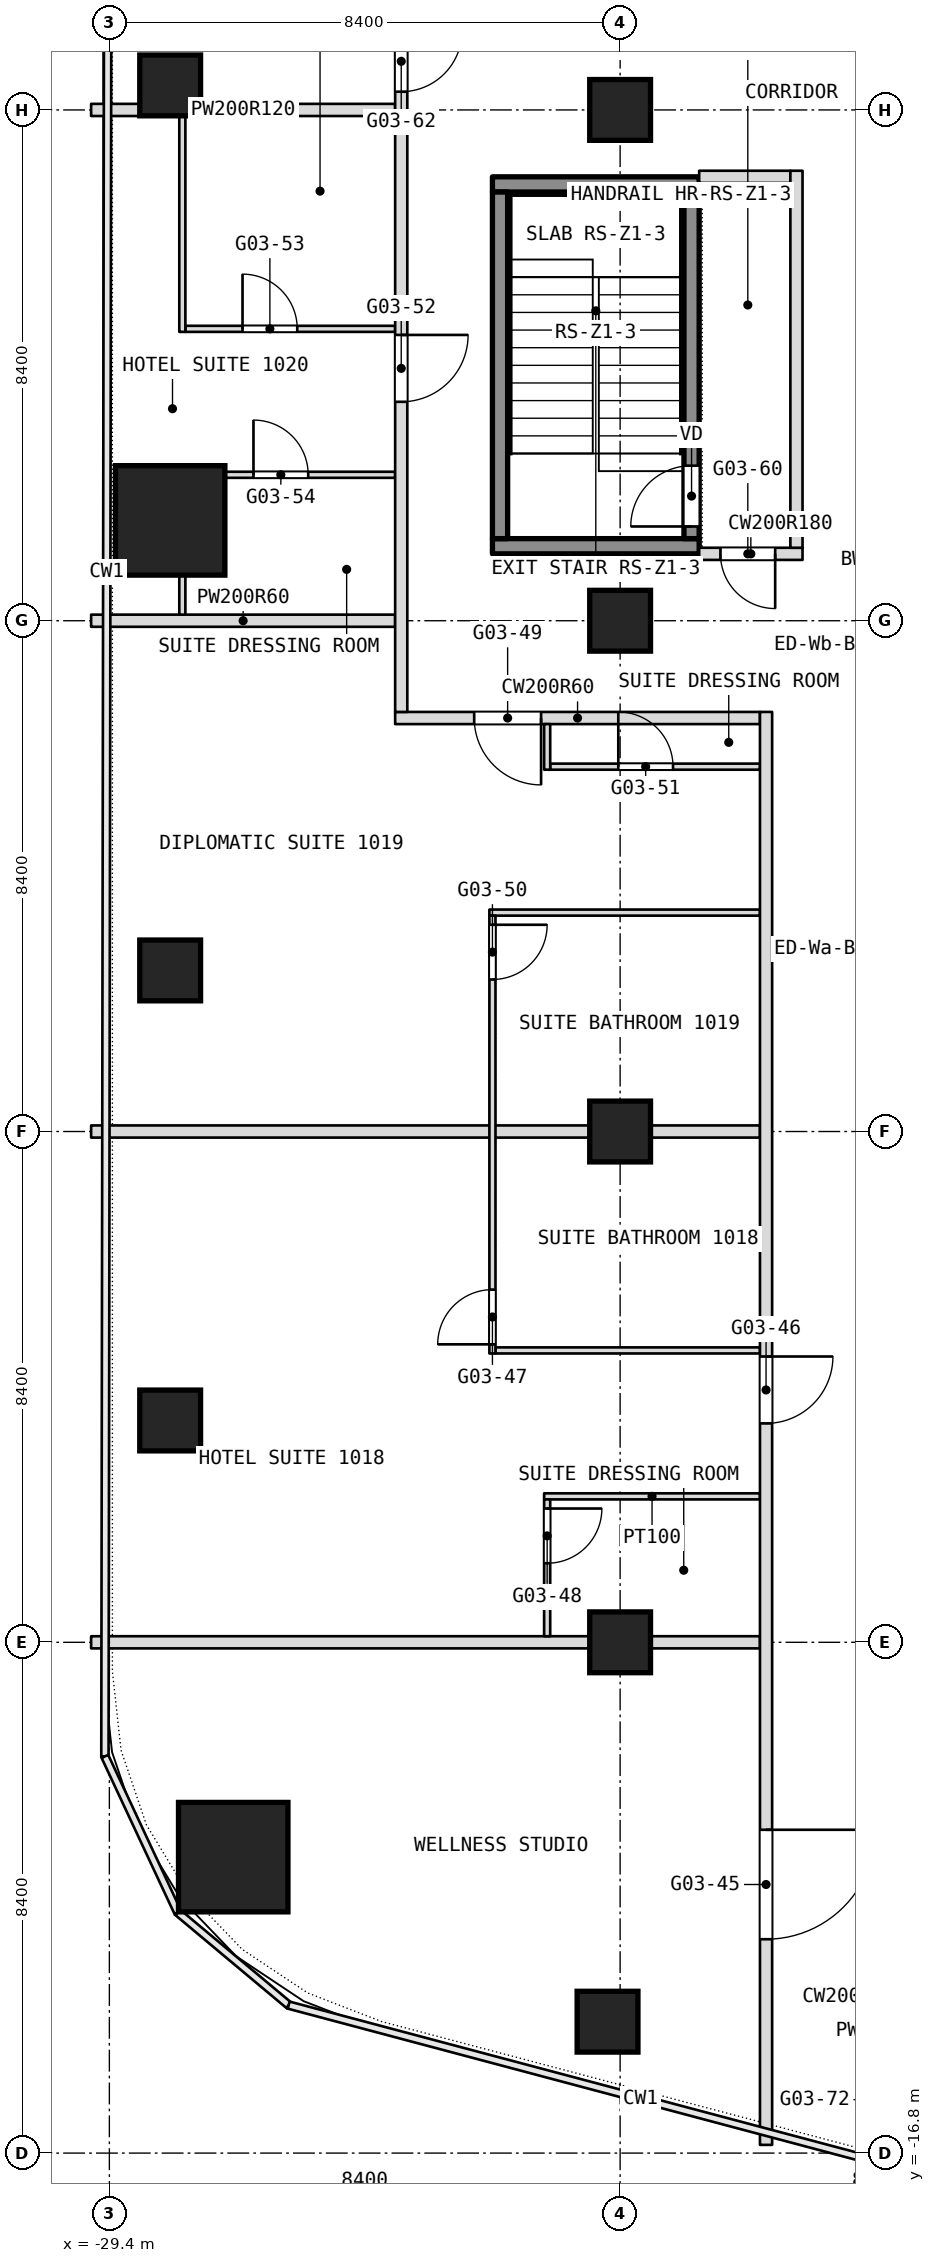
"""IFC4 building model, lengths in metres.
Left out: names, types, materials, properties, quantities, classifications, styles, units other than length and angle.
Written with IfcOpenShell. Run it as: python <this file> out.ifc"""

import sys

from ifc_helpers import new_model, si_unit, direction, frame, frame_2d, origin, origin_2d, place, context, subcontext, project, spatial, rectangle, extrude, element, fill, save


model = new_model("IFC4")
c1 = context("Model", 3, precision=1e-05, world=origin(), true_north=direction((0.0, 1.0)))
c2 = subcontext(c1, "Body", "Model", "MODEL_VIEW")
j1 = project(units=[si_unit("LENGTHUNIT", "METRE"), si_unit("PLANEANGLEUNIT", "RADIAN")], contexts=[c1])
p1 = place(None, origin())
s1 = spatial("IfcSite", under=j1, at=p1, CompositionType="ELEMENT")
p2 = place(p1, origin())
s2 = spatial("IfcBuilding", under=s1, at=p2, CompositionType="ELEMENT")
p3 = place(p2, frame((0.0, 0.0, 50.9)))
s3 = spatial("IfcBuildingStorey", under=s2, at=p3, CompositionType="ELEMENT", Elevation=50.9)
for number, where, z_axis, x_axis in (
    (1, (-27.363, -11.933, 0.0), (0.0, 0.0, 1.0), (1.0, 0.0, 0.0)),
    (2, (-28.4, 10.05, 0.0), (0.0, 0.0, 1.0), (1.0, 0.0, 0.0)),
):
    element("IfcColumn", number, at=place(p3, frame(where, z_axis=z_axis, x_axis=x_axis)), inside=s3, PredefinedType="COLUMN", context=c2, shape_type="SweptSolid", body=[
        extrude(rectangle(XDim=1.8, YDim=1.8, at=origin_2d()), origin(), (0.0, 0.0, 1.0), 3.6),
    ])
for number, where, z_axis, x_axis in (
    (3, (-21.0, -8.4, 0.0), (0.0, 0.0, 1.0), (1.0, 0.0, 0.0)),
    (4, (-21.0, 0.0, 0.0), (0.0, 0.0, 1.0), (1.0, 0.0, 0.0)),
    (5, (-21.0, 8.4, 0.0), (0.0, 0.0, 1.0), (1.0, 0.0, 0.0)),
    (6, (-21.0, 16.8, 0.0), (0.0, 0.0, 1.0), (1.0, 0.0, 0.0)),
    (7, (-28.4, -4.752, 0.0), (0.0, 0.0, 1.0), (1.0, 0.0, 0.0)),
    (8, (-28.4, 2.649, 0.0), (0.0, 0.0, 1.0), (1.0, 0.0, 0.0)),
    (9, (-28.4, 17.203, 0.0), (0.0, 0.0, 1.0), (1.0, 0.0, 0.0)),
    (10, (-21.207, -14.639, 0.0), (0.0, 0.0, 1.0), (1.0, 0.0, 0.0)),
):
    element("IfcColumn", number, at=place(p3, frame(where, z_axis=z_axis, x_axis=x_axis)), inside=s3, PredefinedType="COLUMN", context=c2, shape_type="SweptSolid", body=[
        extrude(rectangle(XDim=1.0, YDim=1.0, at=origin_2d()), origin(), (0.0, 0.0, 1.0), 3.6),
    ])
p4 = place(p3, frame((-29.7, -8.4, 0.0), z_axis=(0.0, 0.0, 1.0), x_axis=(1.0, 0.0, 0.0)))
e11 = element("IfcWall", 11, at=p4, inside=s3, PredefinedType="PARTITIONING", context=c2, shape_type="SweptSolid", body=[
    extrude(rectangle(XDim=11.0, YDim=0.2, at=frame_2d((5.5, 0.0))), origin(), (0.0, 0.0, 1.0), 2.84),
])
p5 = place(p3, frame((-22.25, -6.0, 0.0), z_axis=(0.0, 0.0, 1.0), x_axis=(1.0, 0.0, 0.0)))
e12 = element("IfcWall", 12, at=p5, inside=s3, PredefinedType="PARTITIONING", context=c2, shape_type="SweptSolid", body=[
    extrude(rectangle(XDim=3.55, YDim=0.1, at=frame_2d((1.775, 0.0))), origin(), (0.0, 0.0, 1.0), 3.34),
])
p6 = place(p3, frame((-23.05, -3.6, 0.0), z_axis=(0.0, 0.0, 1.0), x_axis=(1.0, 0.0, 0.0)))
e13 = element("IfcWall", 13, at=p6, inside=s3, PredefinedType="PARTITIONING", context=c2, shape_type="SweptSolid", body=[
    extrude(rectangle(XDim=4.35, YDim=0.1, at=frame_2d((2.175, 0.0))), origin(), (0.0, 0.0, 1.0), 3.34),
])
p7 = place(p3, frame((-29.7, 0.0, 0.0), z_axis=(0.0, 0.0, 1.0), x_axis=(1.0, 0.0, 0.0)))
e14 = element("IfcWall", 14, at=p7, inside=s3, PredefinedType="PARTITIONING", context=c2, shape_type="SweptSolid", body=[
    extrude(rectangle(XDim=11.0, YDim=0.2, at=frame_2d((5.5, 0.0))), origin(), (0.0, 0.0, 1.0), 2.84),
])
p8 = place(p3, frame((-23.15, 3.6, 0.0), z_axis=(0.0, 0.0, 1.0), x_axis=(1.0, 0.0, 0.0)))
e15 = element("IfcWall", 15, at=p8, inside=s3, PredefinedType="PARTITIONING", context=c2, shape_type="SweptSolid", body=[
    extrude(rectangle(XDim=4.45, YDim=0.1, at=frame_2d((2.225, 0.0))), origin(), (0.0, 0.0, 1.0), 3.34),
])
p9 = place(p3, frame((-22.15, 6.0, 0.0), z_axis=(0.0, 0.0, 1.0), x_axis=(1.0, 0.0, 0.0)))
e16 = element("IfcWall", 16, at=p9, inside=s3, PredefinedType="PARTITIONING", context=c2, shape_type="SweptSolid", body=[
    extrude(rectangle(XDim=3.45, YDim=0.1, at=frame_2d((1.725, 0.0))), origin(), (0.0, 0.0, 1.0), 3.34),
])
p10 = place(p9, frame((1.12, 0.0, 0.0)))
e17 = element("IfcOpeningElement", 17, at=p10, cuts=e16, PredefinedType="OPENING", context=c2, shape_type="SweptSolid", body=[
    extrude(rectangle(XDim=0.9, YDim=2.1, at=frame_2d((0.45, 1.05))), frame((0.0, 0.05, 0.0), z_axis=(0.0, -1.0, 0.0), x_axis=(1.0, 0.0, 0.0)), (0.0, 0.0, 1.0), 0.1),
])
p11 = place(p3, frame((-24.7, 6.8, 0.0), z_axis=(0.0, 0.0, 1.0), x_axis=(1.0, 0.0, 0.0)))
e18 = element("IfcWall", 18, at=p11, inside=s3, PredefinedType="PARTITIONING", context=c2, shape_type="SweptSolid", body=[
    extrude(rectangle(XDim=6.0, YDim=0.2, at=frame_2d((3.0, 0.0))), origin(), (0.0, 0.0, 1.0), 3.34),
])
p12 = place(p11, frame((1.3, 0.0, 0.0)))
e19 = element("IfcOpeningElement", 19, at=p12, cuts=e18, PredefinedType="OPENING", context=c2, shape_type="SweptSolid", body=[
    extrude(rectangle(XDim=1.1, YDim=2.1, at=frame_2d((0.55, 1.05))), frame((0.0, 0.1, 0.0), z_axis=(0.0, -1.0, 0.0), x_axis=(1.0, 0.0, 0.0)), (0.0, 0.0, 1.0), 0.2),
])
p13 = place(p3, frame((-29.7, 8.4, 0.0), z_axis=(0.0, 0.0, 1.0), x_axis=(1.0, 0.0, 0.0)))
e20 = element("IfcWall", 20, at=p13, inside=s3, PredefinedType="PARTITIONING", context=c2, shape_type="SweptSolid", body=[
    extrude(rectangle(XDim=5.0, YDim=0.2, at=frame_2d((2.5, 0.0))), origin(), (0.0, 0.0, 1.0), 2.84),
])
p14 = place(p3, frame((-19.7, 9.5, 0.0), z_axis=(0.0, 0.0, 1.0), x_axis=(1.0, 0.0, 0.0)))
e21 = element("IfcWall", 21, at=p14, inside=s3, PredefinedType="PARTITIONING", context=c2, shape_type="SweptSolid", body=[
    extrude(rectangle(XDim=1.7, YDim=0.2, at=frame_2d((0.85, 0.0))), origin(), (0.0, 0.0, 1.0), 3.34),
])
p15 = place(p14, frame((0.35, 0.0, 0.0)))
e22 = element("IfcOpeningElement", 22, at=p15, cuts=e21, PredefinedType="OPENING", context=c2, shape_type="SweptSolid", body=[
    extrude(rectangle(XDim=0.9, YDim=2.1, at=frame_2d((0.45, 1.05))), frame((0.0, 0.1, 0.0), z_axis=(0.0, -1.0, 0.0), x_axis=(1.0, 0.0, 0.0)), (0.0, 0.0, 1.0), 0.2),
])
p16 = place(p3, frame((-27.5, 10.8, 0.0), z_axis=(0.0, 0.0, 1.0), x_axis=(1.0, 0.0, 0.0)))
e23 = element("IfcWall", 23, at=p16, inside=s3, PredefinedType="PARTITIONING", context=c2, shape_type="SweptSolid", body=[
    extrude(rectangle(XDim=2.8, YDim=0.1, at=frame_2d((1.4, 0.0))), origin(), (0.0, 0.0, 1.0), 3.34),
])
p17 = place(p16, frame((0.47, 0.0, 0.0)))
e24 = element("IfcOpeningElement", 24, at=p17, cuts=e23, PredefinedType="OPENING", context=c2, shape_type="SweptSolid", body=[
    extrude(rectangle(XDim=0.9, YDim=2.1, at=frame_2d((0.45, 1.05))), frame((0.0, 0.05, 0.0), z_axis=(0.0, -1.0, 0.0), x_axis=(1.0, 0.0, 0.0)), (0.0, 0.0, 1.0), 0.1),
])
p18 = place(p3, frame((-28.15, 13.2, 0.0), z_axis=(0.0, 0.0, 1.0), x_axis=(1.0, 0.0, 0.0)))
e25 = element("IfcWall", 25, at=p18, inside=s3, PredefinedType="PARTITIONING", context=c2, shape_type="SweptSolid", body=[
    extrude(rectangle(XDim=3.45, YDim=0.1, at=frame_2d((1.725, 0.0))), origin(), (0.0, 0.0, 1.0), 3.34),
])
p19 = place(p18, frame((0.94, 0.0, 0.0)))
e26 = element("IfcOpeningElement", 26, at=p19, cuts=e25, PredefinedType="OPENING", context=c2, shape_type="SweptSolid", body=[
    extrude(rectangle(XDim=0.9, YDim=2.1, at=frame_2d((0.45, 1.05))), frame((0.0, 0.05, 0.0), z_axis=(0.0, -1.0, 0.0), x_axis=(1.0, 0.0, 0.0)), (0.0, 0.0, 1.0), 0.1),
])
p20 = place(p3, frame((-19.7, 15.7, 0.0), z_axis=(0.0, 0.0, 1.0), x_axis=(1.0, 0.0, 0.0)))
e27 = element("IfcWall", 27, at=p20, inside=s3, PredefinedType="PARTITIONING", context=c2, shape_type="SweptSolid", body=[
    extrude(rectangle(XDim=1.5, YDim=0.2, at=frame_2d((0.75, 0.0))), origin(), (0.0, 0.0, 1.0), 3.34),
])
p21 = place(p3, frame((-29.7, 16.8, 0.0), z_axis=(0.0, 0.0, 1.0), x_axis=(1.0, 0.0, 0.0)))
e28 = element("IfcWall", 28, at=p21, inside=s3, PredefinedType="PARTITIONING", context=c2, shape_type="SweptSolid", body=[
    extrude(rectangle(XDim=5.0, YDim=0.2, at=frame_2d((2.5, 0.0))), origin(), (0.0, 0.0, 1.0), 2.84),
])
p22 = place(p3, frame((-18.1, 9.6, 0.0), z_axis=(0.0, 0.0, 1.0), x_axis=(0.0, 1.0, 0.0)))
e29 = element("IfcWall", 29, at=p22, inside=s3, PredefinedType="PARTITIONING", context=c2, shape_type="SweptSolid", body=[
    extrude(rectangle(XDim=6.2, YDim=0.2, at=frame_2d((3.1, 0.0))), origin(), (0.0, 0.0, 1.0), 3.34),
])
p23 = place(p3, frame((-18.6, -16.665, 0.0), z_axis=(0.0, 0.0, 1.0), x_axis=(0.0, 1.0, 0.0)))
e30 = element("IfcWall", 30, at=p23, inside=s3, PredefinedType="PARTITIONING", context=c2, shape_type="SweptSolid", body=[
    extrude(rectangle(XDim=23.565, YDim=0.2, at=frame_2d((11.782, 0.0))), origin(), (0.0, 0.0, 1.0), 3.34),
])
p24 = place(p23, frame((3.382, 0.0, 0.0)))
e31 = element("IfcOpeningElement", 31, at=p24, cuts=e30, PredefinedType="OPENING", context=c2, shape_type="SweptSolid", body=[
    extrude(rectangle(XDim=1.8, YDim=2.1, at=frame_2d((0.9, 1.05))), frame((0.0, 0.1, 0.0), z_axis=(0.0, -1.0, 0.0), x_axis=(1.0, 0.0, 0.0)), (0.0, 0.0, 1.0), 0.2),
])
p25 = place(p23, frame((11.865, 0.0, 0.0)))
e32 = element("IfcOpeningElement", 32, at=p25, cuts=e30, PredefinedType="OPENING", context=c2, shape_type="SweptSolid", body=[
    extrude(rectangle(XDim=1.1, YDim=2.1, at=frame_2d((0.55, 1.05))), frame((0.0, 0.1, 0.0), z_axis=(0.0, -1.0, 0.0), x_axis=(1.0, 0.0, 0.0)), (0.0, 0.0, 1.0), 0.2),
])
p26 = place(p3, frame((-22.2, -8.3, 0.0), z_axis=(0.0, 0.0, 1.0), x_axis=(0.0, 1.0, 0.0)))
e33 = element("IfcWall", 33, at=p26, inside=s3, PredefinedType="PARTITIONING", context=c2, shape_type="SweptSolid", body=[
    extrude(rectangle(XDim=2.25, YDim=0.1, at=frame_2d((1.125, 0.0))), origin(), (0.0, 0.0, 1.0), 3.34),
])
p27 = place(p26, frame((1.2, 0.0, 0.0)))
e34 = element("IfcOpeningElement", 34, at=p27, cuts=e33, PredefinedType="OPENING", context=c2, shape_type="SweptSolid", body=[
    extrude(rectangle(XDim=0.9, YDim=2.1, at=frame_2d((0.45, 1.05))), frame((0.0, 0.05, 0.0), z_axis=(0.0, -1.0, 0.0), x_axis=(1.0, 0.0, 0.0)), (0.0, 0.0, 1.0), 0.1),
])
p28 = place(p3, frame((-22.2, 5.95, 0.0), z_axis=(0.0, 0.0, 1.0), x_axis=(0.0, 1.0, 0.0)))
e35 = element("IfcWall", 35, at=p28, inside=s3, PredefinedType="PARTITIONING", context=c2, shape_type="SweptSolid", body=[
    extrude(rectangle(XDim=0.75, YDim=0.1, at=frame_2d((0.375, 0.0))), origin(), (0.0, 0.0, 1.0), 3.34),
])
p29 = place(p3, frame((-23.1, -3.65, 0.0), z_axis=(0.0, 0.0, 1.0), x_axis=(0.0, 1.0, 0.0)))
e36 = element("IfcWall", 36, at=p29, inside=s3, PredefinedType="PARTITIONING", context=c2, shape_type="SweptSolid", body=[
    extrude(rectangle(XDim=7.2, YDim=0.1, at=frame_2d((3.6, 0.0))), origin(), (0.0, 0.0, 1.0), 3.34),
])
p30 = place(p29, frame((0.15, 0.0, 0.0)))
e37 = element("IfcOpeningElement", 37, at=p30, cuts=e36, PredefinedType="OPENING", context=c2, shape_type="SweptSolid", body=[
    extrude(rectangle(XDim=0.9, YDim=2.1, at=frame_2d((0.45, 1.05))), frame((0.0, 0.05, 0.0), z_axis=(0.0, -1.0, 0.0), x_axis=(1.0, 0.0, 0.0)), (0.0, 0.0, 1.0), 0.1),
])
p31 = place(p29, frame((6.15, 0.0, 0.0)))
e38 = element("IfcOpeningElement", 38, at=p31, cuts=e36, PredefinedType="OPENING", context=c2, shape_type="SweptSolid", body=[
    extrude(rectangle(XDim=0.9, YDim=2.1, at=frame_2d((0.45, 1.05))), frame((0.0, 0.05, 0.0), z_axis=(0.0, -1.0, 0.0), x_axis=(1.0, 0.0, 0.0)), (0.0, 0.0, 1.0), 0.1),
])
p32 = place(p3, frame((-24.6, 6.9, 0.0), z_axis=(0.0, 0.0, 1.0), x_axis=(0.0, 1.0, 0.0)))
e39 = element("IfcWall", 39, at=p32, inside=s3, PredefinedType="PARTITIONING", context=c2, shape_type="SweptSolid", body=[
    extrude(rectangle(XDim=11.6, YDim=0.2, at=frame_2d((5.8, 0.0))), origin(), (0.0, 0.0, 1.0), 3.34),
])
p33 = place(p32, frame((5.1, 0.0, 0.0)))
e40 = element("IfcOpeningElement", 40, at=p33, cuts=e39, PredefinedType="OPENING", context=c2, shape_type="SweptSolid", body=[
    extrude(rectangle(XDim=1.1, YDim=2.1, at=frame_2d((0.55, 1.05))), frame((0.0, 0.1, 0.0), z_axis=(0.0, -1.0, 0.0), x_axis=(1.0, 0.0, 0.0)), (0.0, 0.0, 1.0), 0.2),
])
p34 = place(p32, frame((10.2, 0.0, 0.0)))
e41 = element("IfcOpeningElement", 41, at=p34, cuts=e39, PredefinedType="OPENING", context=c2, shape_type="SweptSolid", body=[
    extrude(rectangle(XDim=1.0, YDim=2.1, at=frame_2d((0.5, 1.05))), frame((0.0, 0.1, 0.0), z_axis=(0.0, -1.0, 0.0), x_axis=(1.0, 0.0, 0.0)), (0.0, 0.0, 1.0), 0.2),
])
p35 = place(p3, frame((-28.2, 8.5, 0.0), z_axis=(0.0, 0.0, 1.0), x_axis=(0.0, 1.0, 0.0)))
e42 = element("IfcWall", 42, at=p35, inside=s3, PredefinedType="PARTITIONING", context=c2, shape_type="SweptSolid", body=[
    extrude(rectangle(XDim=0.65, YDim=0.1, at=frame_2d((0.325, 0.0))), origin(), (0.0, 0.0, 1.0), 2.94),
])
p36 = place(p3, frame((-28.2, 13.15, 0.0), z_axis=(0.0, 0.0, 1.0), x_axis=(0.0, 1.0, 0.0)))
e43 = element("IfcWall", 43, at=p36, inside=s3, PredefinedType="PARTITIONING", context=c2, shape_type="SweptSolid", body=[
    extrude(rectangle(XDim=3.75, YDim=0.1, at=frame_2d((1.875, 0.0))), origin(), (0.0, 0.0, 1.0), 2.94),
])
for number, where, z_axis, x_axis in (
    (44, (-23.1, 9.625, 0.1), (0.0, 0.0, 1.0), (1.0, 0.0, 0.0)),
    (45, (-23.1, 15.575, 0.1), (0.0, 0.0, 1.0), (1.0, 0.0, 0.0)),
):
    element("IfcWall", number, at=place(p3, frame(where, z_axis=z_axis, x_axis=x_axis)), inside=s3, PredefinedType="SHEAR", context=c2, shape_type="SweptSolid", body=[
        extrude(rectangle(XDim=3.4, YDim=0.25, at=frame_2d((1.7, 0.0))), origin(), (0.0, 0.0, 1.0), 3.6),
    ])
p37 = place(p3, frame((-22.975, 9.75, 0.1), z_axis=(0.0, 0.0, 1.0), x_axis=(0.0, 1.0, 0.0)))
e46 = element("IfcWall", 46, at=p37, inside=s3, PredefinedType="SHEAR", context=c2, shape_type="SweptSolid", body=[
    extrude(rectangle(XDim=5.7, YDim=0.25, at=frame_2d((2.85, 0.0))), origin(), (0.0, 0.0, 1.0), 3.6),
])
p38 = place(p3, frame((-19.825, 9.75, 0.1), z_axis=(0.0, 0.0, 1.0), x_axis=(0.0, 1.0, 0.0)))
e47 = element("IfcWall", 47, at=p38, inside=s3, PredefinedType="SHEAR", context=c2, shape_type="SweptSolid", body=[
    extrude(rectangle(XDim=5.7, YDim=0.25, at=frame_2d((2.85, 0.0))), origin(), (0.0, 0.0, 1.0), 3.6),
])
p39 = place(p38, frame((0.2, 0.0, 0.0)))
e48 = element("IfcOpeningElement", 48, at=p39, cuts=e47, PredefinedType="OPENING", context=c2, shape_type="SweptSolid", body=[
    extrude(rectangle(XDim=1.0, YDim=2.1, at=frame_2d((0.5, 1.05))), frame((0.0, 0.125, 0.0), z_axis=(0.0, -1.0, 0.0), x_axis=(1.0, 0.0, 0.0)), (0.0, 0.0, 1.0), 0.25),
])
p40 = place(p10, origin())
e49 = element("IfcDoor", 49, at=p40, inside=s3, OperationType="SINGLE_SWING_RIGHT", PredefinedType="DOOR", context=c2, shape_type="SweptSolid", body=[
    extrude(rectangle(XDim=0.9, YDim=2.1, at=frame_2d((0.45, 1.05))), frame((0.0, 0.025, 0.0), z_axis=(0.0, -1.0, 0.0), x_axis=(1.0, 0.0, 0.0)), (0.0, 0.0, 1.0), 0.05),
])
fill(e17, e49)
p41 = place(p12, origin())
e50 = element("IfcDoor", 50, at=p41, inside=s3, OperationType="SINGLE_SWING_LEFT", PredefinedType="DOOR", context=c2, shape_type="SweptSolid", body=[
    extrude(rectangle(XDim=1.1, YDim=2.1, at=frame_2d((0.55, 1.05))), frame((0.0, 0.025, 0.0), z_axis=(0.0, -1.0, 0.0), x_axis=(1.0, 0.0, 0.0)), (0.0, 0.0, 1.0), 0.05),
])
fill(e19, e50)
p42 = place(p15, origin())
e51 = element("IfcDoor", 51, at=p42, inside=s3, OperationType="SINGLE_SWING_RIGHT", PredefinedType="DOOR", context=c2, shape_type="SweptSolid", body=[
    extrude(rectangle(XDim=0.9, YDim=2.1, at=frame_2d((0.45, 1.05))), frame((0.0, 0.025, 0.0), z_axis=(0.0, -1.0, 0.0), x_axis=(1.0, 0.0, 0.0)), (0.0, 0.0, 1.0), 0.05),
])
fill(e22, e51)
p43 = place(p17, origin())
e52 = element("IfcDoor", 52, at=p43, inside=s3, OperationType="SINGLE_SWING_RIGHT", PredefinedType="DOOR", context=c2, shape_type="SweptSolid", body=[
    extrude(rectangle(XDim=0.9, YDim=2.1, at=frame_2d((0.45, 1.05))), frame((0.0, 0.025, 0.0), z_axis=(0.0, -1.0, 0.0), x_axis=(1.0, 0.0, 0.0)), (0.0, 0.0, 1.0), 0.05),
])
fill(e24, e52)
p44 = place(p19, origin())
e53 = element("IfcDoor", 53, at=p44, inside=s3, OperationType="SINGLE_SWING_LEFT", PredefinedType="DOOR", context=c2, shape_type="SweptSolid", body=[
    extrude(rectangle(XDim=0.9, YDim=2.1, at=frame_2d((0.45, 1.05))), frame((0.0, 0.025, 0.0), z_axis=(0.0, -1.0, 0.0), x_axis=(1.0, 0.0, 0.0)), (0.0, 0.0, 1.0), 0.05),
])
fill(e26, e53)
p45 = place(p24, origin())
e54 = element("IfcDoor", 54, at=p45, inside=s3, OperationType="DOUBLE_DOOR_SINGLE_SWING", PredefinedType="DOOR", context=c2, shape_type="SweptSolid", body=[
    extrude(rectangle(XDim=1.8, YDim=2.1, at=frame_2d((0.9, 1.05))), frame((0.0, 0.025, 0.0), z_axis=(0.0, -1.0, 0.0), x_axis=(1.0, 0.0, 0.0)), (0.0, 0.0, 1.0), 0.05),
])
fill(e31, e54)
p46 = place(p25, origin())
e55 = element("IfcDoor", 55, at=p46, inside=s3, OperationType="SINGLE_SWING_RIGHT", PredefinedType="DOOR", context=c2, shape_type="SweptSolid", body=[
    extrude(rectangle(XDim=1.1, YDim=2.1, at=frame_2d((0.55, 1.05))), frame((0.0, 0.025, 0.0), z_axis=(0.0, -1.0, 0.0), x_axis=(1.0, 0.0, 0.0)), (0.0, 0.0, 1.0), 0.05),
])
fill(e32, e55)
p47 = place(p27, origin())
e56 = element("IfcDoor", 56, at=p47, inside=s3, OperationType="SINGLE_SWING_LEFT", PredefinedType="DOOR", context=c2, shape_type="SweptSolid", body=[
    extrude(rectangle(XDim=0.9, YDim=2.1, at=frame_2d((0.45, 1.05))), frame((0.0, 0.025, 0.0), z_axis=(0.0, -1.0, 0.0), x_axis=(1.0, 0.0, 0.0)), (0.0, 0.0, 1.0), 0.05),
])
fill(e34, e56)
p48 = place(p30, origin())
e57 = element("IfcDoor", 57, at=p48, inside=s3, OperationType="SINGLE_SWING_RIGHT", PredefinedType="DOOR", context=c2, shape_type="SweptSolid", body=[
    extrude(rectangle(XDim=0.9, YDim=2.1, at=frame_2d((0.45, 1.05))), frame((0.0, 0.025, 0.0), z_axis=(0.0, -1.0, 0.0), x_axis=(1.0, 0.0, 0.0)), (0.0, 0.0, 1.0), 0.05),
])
fill(e37, e57)
p49 = place(p31, origin())
e58 = element("IfcDoor", 58, at=p49, inside=s3, OperationType="SINGLE_SWING_LEFT", PredefinedType="DOOR", context=c2, shape_type="SweptSolid", body=[
    extrude(rectangle(XDim=0.9, YDim=2.1, at=frame_2d((0.45, 1.05))), frame((0.0, 0.025, 0.0), z_axis=(0.0, -1.0, 0.0), x_axis=(1.0, 0.0, 0.0)), (0.0, 0.0, 1.0), 0.05),
])
fill(e38, e58)
p50 = place(p33, origin())
e59 = element("IfcDoor", 59, at=p50, inside=s3, OperationType="SINGLE_SWING_RIGHT", PredefinedType="DOOR", context=c2, shape_type="SweptSolid", body=[
    extrude(rectangle(XDim=1.1, YDim=2.1, at=frame_2d((0.55, 1.05))), frame((0.0, 0.025, 0.0), z_axis=(0.0, -1.0, 0.0), x_axis=(1.0, 0.0, 0.0)), (0.0, 0.0, 1.0), 0.05),
])
fill(e40, e59)
p51 = place(p34, origin())
e60 = element("IfcDoor", 60, at=p51, inside=s3, OperationType="SINGLE_SWING_RIGHT", PredefinedType="DOOR", context=c2, shape_type="SweptSolid", body=[
    extrude(rectangle(XDim=1.0, YDim=2.1, at=frame_2d((0.5, 1.05))), frame((0.0, 0.025, 0.0), z_axis=(0.0, -1.0, 0.0), x_axis=(1.0, 0.0, 0.0)), (0.0, 0.0, 1.0), 0.05),
])
fill(e41, e60)
p52 = place(p39, origin())
e61 = element("IfcDoor", 61, at=p52, inside=s3, OperationType="SINGLE_SWING_LEFT", PredefinedType="DOOR", context=c2, shape_type="SweptSolid", body=[
    extrude(rectangle(XDim=1.0, YDim=2.1, at=frame_2d((0.5, 1.05))), frame((0.0, 0.025, 0.0), z_axis=(0.0, -1.0, 0.0), x_axis=(1.0, 0.0, 0.0)), (0.0, 0.0, 1.0), 0.05),
])
fill(e48, e61)
save(model, sys.argv[1])
